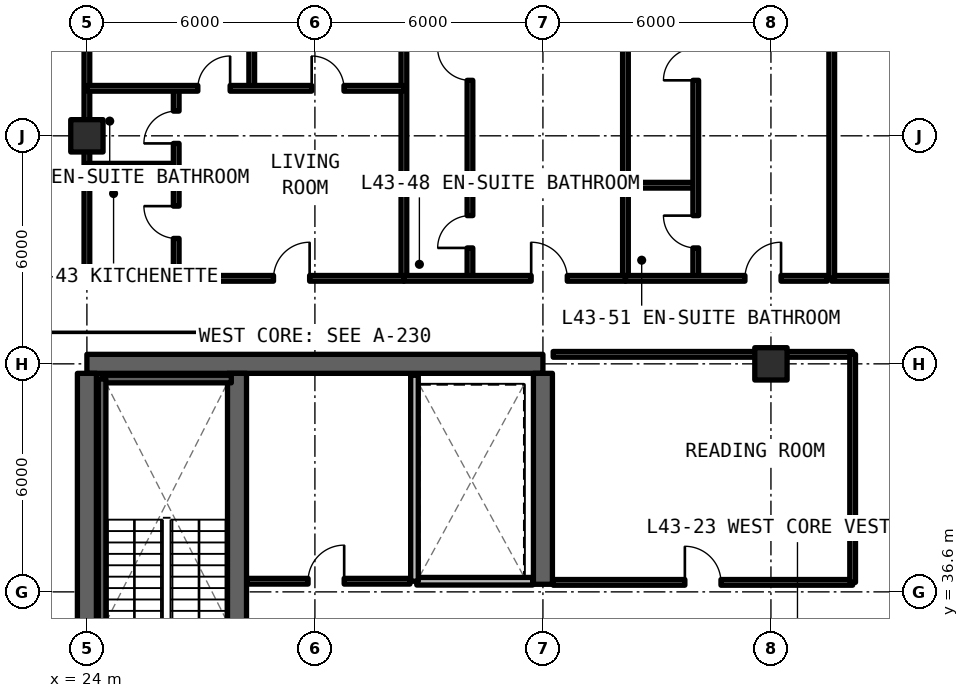
"""IFC4 building model, lengths in metres.
Left out: names, types, materials, properties, quantities, classifications, styles, units other than length and angle.
Written with IfcOpenShell. Run it as: python <this file> out.ifc"""

import sys

from ifc_helpers import new_model, si_unit, direction, frame, frame_2d, origin, origin_2d, place, context, subcontext, project, spatial, rectangle, extrude, element, fill, save


model = new_model("IFC4")
c1 = context("Model", 3, precision=1e-05, world=origin(), true_north=direction((0.0, 1.0)))
c2 = subcontext(c1, "Body", "Model", "MODEL_VIEW")
j1 = project(units=[si_unit("LENGTHUNIT", "METRE"), si_unit("PLANEANGLEUNIT", "RADIAN")], contexts=[c1])
p1 = place(None, origin())
s1 = spatial("IfcSite", under=j1, at=p1, CompositionType="ELEMENT")
p2 = place(p1, origin())
s2 = spatial("IfcBuilding", under=s1, at=p2, CompositionType="ELEMENT")
p3 = place(p2, frame((0.0, 0.0, 155.1)))
s3 = spatial("IfcBuildingStorey", under=s2, at=p3, CompositionType="ELEMENT", Elevation=155.1)
p4 = place(p3, frame((36.0, 42.6, 0.0), z_axis=(0.0, 0.0, 1.0), x_axis=(-1.0, 0.0, 0.0)))
e1 = element("IfcWall", 1, at=p4, inside=s3, PredefinedType="SHEAR", context=c2, shape_type="SweptSolid", body=[
    extrude(rectangle(XDim=12.0, YDim=0.5, at=frame_2d((6.0, 0.0))), origin(), (0.0, 0.0, 1.0), 3.3),
])
p5 = place(p3, frame((24.0, 24.85, 0.0), z_axis=(0.0, 0.0, 1.0), x_axis=(0.0, 1.0, 0.0)))
e2 = element("IfcWall", 2, at=p5, inside=s3, PredefinedType="SHEAR", context=c2, shape_type="SweptSolid", body=[
    extrude(rectangle(XDim=17.5, YDim=0.5, at=frame_2d((8.75, 0.0))), origin(), (0.0, 0.0, 1.0), 3.3),
])
p6 = place(p3, frame((36.0, 36.8, 0.0), z_axis=(0.0, 0.0, 1.0), x_axis=(0.0, 1.0, 0.0)))
e3 = element("IfcWall", 3, at=p6, inside=s3, PredefinedType="SHEAR", context=c2, shape_type="SweptSolid", body=[
    extrude(rectangle(XDim=5.55, YDim=0.5, at=frame_2d((2.775, 0.0))), origin(), (0.0, 0.0, 1.0), 3.3),
])
p7 = place(p3, frame((27.95, 24.85, 0.0), z_axis=(0.0, 0.0, 1.0), x_axis=(0.0, 1.0, 0.0)))
e4 = element("IfcWall", 4, at=p7, inside=s3, PredefinedType="SHEAR", context=c2, shape_type="SweptSolid", body=[
    extrude(rectangle(XDim=17.5, YDim=0.5, at=frame_2d((8.75, 0.0))), origin(), (0.0, 0.0, 1.0), 3.3),
])
p8 = place(p7, frame((0.4, 0.0, 0.0)))
e5 = element("IfcOpeningElement", 5, at=p8, cuts=e4, PredefinedType="OPENING", context=c2, shape_type="SweptSolid", body=[
    extrude(rectangle(XDim=1.15, YDim=2.15, at=frame_2d((0.575, 1.075))), frame((0.0, 0.26, 0.0), z_axis=(0.0, -1.0, 0.0), x_axis=(1.0, 0.0, 0.0)), (0.0, 0.0, 1.0), 0.52),
])
p9 = place(p7, frame((9.6, 0.0, 0.0)))
e6 = element("IfcOpeningElement", 6, at=p9, cuts=e4, PredefinedType="OPENING", context=c2, shape_type="SweptSolid", body=[
    extrude(rectangle(XDim=1.15, YDim=2.15, at=frame_2d((0.575, 1.075))), frame((0.0, 0.26, 0.0), z_axis=(0.0, -1.0, 0.0), x_axis=(1.0, 0.0, 0.0)), (0.0, 0.0, 1.0), 0.52),
])
for number, where, z_axis, x_axis in (
    (7, (42.0, 42.6, 0.0), (0.0, 0.0, 1.0), (1.0, 0.0, 0.0)),
    (8, (24.0, 48.6, 0.0), (0.0, 0.0, 1.0), (1.0, 0.0, 0.0)),
):
    element("IfcColumn", number, at=place(p3, frame(where, z_axis=z_axis, x_axis=x_axis)), inside=s3, PredefinedType="COLUMN", context=c2, shape_type="SweptSolid", body=[
        extrude(rectangle(XDim=0.85, YDim=0.85, at=origin_2d()), origin(), (0.0, 0.0, 1.0), 3.3),
    ])
p10 = place(p3, frame((28.22, 36.88, 0.0), z_axis=(0.0, 0.0, 1.0), x_axis=(1.0, 0.0, 0.0)))
e9 = element("IfcWall", 9, at=p10, inside=s3, PredefinedType="SOLIDWALL", context=c2, shape_type="SweptSolid", body=[
    extrude(rectangle(XDim=4.28, YDim=0.15, at=frame_2d((2.14, 0.0))), origin(), (0.0, 0.0, 1.0), 2.35),
])
p11 = place(p10, frame((1.6, 0.0, 0.0)))
e10 = element("IfcOpeningElement", 10, at=p11, cuts=e9, PredefinedType="OPENING", context=c2, shape_type="SweptSolid", body=[
    extrude(rectangle(XDim=0.95, YDim=2.15, at=frame_2d((0.475, 1.075))), frame((0.0, 0.085, 0.0), z_axis=(0.0, -1.0, 0.0), x_axis=(1.0, 0.0, 0.0)), (0.0, 0.0, 1.0), 0.17),
])
p12 = place(p3, frame((32.68, 36.88, 0.0), z_axis=(0.0, 0.0, 1.0), x_axis=(1.0, 0.0, 0.0)))
e11 = element("IfcWall", 11, at=p12, inside=s3, PredefinedType="SOLIDWALL", context=c2, shape_type="SweptSolid", body=[
    extrude(rectangle(XDim=3.05, YDim=0.2, at=frame_2d((1.525, 0.0))), origin(), (0.0, 0.0, 1.0), 2.35),
])
p13 = place(p3, frame((32.62, 36.88, 0.0), z_axis=(0.0, 0.0, 1.0), x_axis=(0.0, 1.0, 0.0)))
e12 = element("IfcWall", 12, at=p13, inside=s3, PredefinedType="SOLIDWALL", context=c2, shape_type="SweptSolid", body=[
    extrude(rectangle(XDim=5.42, YDim=0.2, at=frame_2d((2.71, 0.0))), origin(), (0.0, 0.0, 1.0), 2.35),
])
p14 = place(p3, frame((36.27, 36.85, 0.0), z_axis=(0.0, 0.0, 1.0), x_axis=(1.0, 0.0, 0.0)))
e13 = element("IfcWall", 13, at=p14, inside=s3, PredefinedType="SOLIDWALL", context=c2, shape_type="SweptSolid", body=[
    extrude(rectangle(XDim=7.88, YDim=0.15, at=frame_2d((3.94, 0.0))), origin(), (0.0, 0.0, 1.0), 2.35),
])
p15 = place(p14, frame((3.465, 0.0, 0.0)))
e14 = element("IfcOpeningElement", 14, at=p15, cuts=e13, PredefinedType="OPENING", context=c2, shape_type="SweptSolid", body=[
    extrude(rectangle(XDim=0.95, YDim=2.15, at=frame_2d((0.475, 1.075))), frame((0.0, 0.085, 0.0), z_axis=(0.0, -1.0, 0.0), x_axis=(1.0, 0.0, 0.0)), (0.0, 0.0, 1.0), 0.17),
])
p16 = place(p3, frame((36.27, 42.85, 0.0), z_axis=(0.0, 0.0, 1.0), x_axis=(1.0, 0.0, 0.0)))
e15 = element("IfcWall", 15, at=p16, inside=s3, PredefinedType="SOLIDWALL", context=c2, shape_type="SweptSolid", body=[
    extrude(rectangle(XDim=7.88, YDim=0.15, at=frame_2d((3.94, 0.0))), origin(), (0.0, 0.0, 1.0), 2.35),
])
p17 = place(p3, frame((44.15, 36.85, 0.0), z_axis=(0.0, 0.0, 1.0), x_axis=(0.0, 1.0, 0.0)))
e16 = element("IfcWall", 16, at=p17, inside=s3, PredefinedType="SOLIDWALL", context=c2, shape_type="SweptSolid", body=[
    extrude(rectangle(XDim=6.0, YDim=0.15, at=frame_2d((3.0, 0.0))), origin(), (0.0, 0.0, 1.0), 2.35),
])
p18 = place(p3, frame((43.6, 44.85, 0.0), z_axis=(0.0, 0.0, 1.0), x_axis=(1.0, 0.0, 0.0)))
e17 = element("IfcWall", 17, at=p18, inside=s3, PredefinedType="SOLIDWALL", context=c2, shape_type="SweptSolid", body=[
    extrude(rectangle(XDim=8.4, YDim=0.15, at=frame_2d((4.2, 0.0))), origin(), (0.0, 0.0, 1.0), 2.35),
])
p19 = place(p18, frame((3.65, 0.0, 0.0)))
e18 = element("IfcOpeningElement", 18, at=p19, cuts=e17, PredefinedType="OPENING", context=c2, shape_type="SweptSolid", body=[
    extrude(rectangle(XDim=1.1, YDim=2.15, at=frame_2d((0.55, 1.075))), frame((0.0, 0.085, 0.0), z_axis=(0.0, -1.0, 0.0), x_axis=(1.0, 0.0, 0.0)), (0.0, 0.0, 1.0), 0.17),
])
for number, where, z_axis, x_axis in (
    (19, (43.6, 44.85, 0.0), (0.0, 0.0, 1.0), (0.0, 1.0, 0.0)),
    (20, (24.0, 44.85, 0.0), (0.0, 0.0, 1.0), (0.0, 1.0, 0.0)),
    (21, (32.342, 44.85, 0.0), (0.0, 0.0, 1.0), (0.0, 1.0, 0.0)),
):
    element("IfcWall", number, at=place(p3, frame(where, z_axis=z_axis, x_axis=x_axis)), inside=s3, PredefinedType="SOLIDWALL", context=c2, shape_type="SweptSolid", body=[
        extrude(rectangle(XDim=10.2, YDim=0.15, at=frame_2d((5.1, 0.0))), origin(), (0.0, 0.0, 1.0), 2.35),
    ])
p20 = place(p3, frame((24.0, 47.8, 0.0), z_axis=(0.0, 0.0, 1.0), x_axis=(1.0, 0.0, 0.0)))
e22 = element("IfcWall", 22, at=p20, inside=s3, PredefinedType="PARTITIONING", context=c2, shape_type="SweptSolid", body=[
    extrude(rectangle(XDim=2.35, YDim=0.15, at=frame_2d((1.175, 0.0))), origin(), (0.0, 0.0, 1.0), 2.35),
])
p21 = place(p3, frame((26.35, 44.85, 0.0), z_axis=(0.0, 0.0, 1.0), x_axis=(0.0, 1.0, 0.0)))
e23 = element("IfcWall", 23, at=p21, inside=s3, PredefinedType="PARTITIONING", context=c2, shape_type="SweptSolid", body=[
    extrude(rectangle(XDim=5.0, YDim=0.15, at=frame_2d((2.5, 0.0))), origin(), (0.0, 0.0, 1.0), 2.35),
])
p22 = place(p21, frame((1.05, 0.0, 0.0)))
e24 = element("IfcOpeningElement", 24, at=p22, cuts=e23, PredefinedType="OPENING", context=c2, shape_type="SweptSolid", body=[
    extrude(rectangle(XDim=0.85, YDim=2.1, at=frame_2d((0.425, 1.05))), frame((0.0, 0.085, 0.0), z_axis=(0.0, -1.0, 0.0), x_axis=(1.0, 0.0, 0.0)), (0.0, 0.0, 1.0), 0.17),
])
p23 = place(p21, frame((3.55, 0.0, 0.0)))
e25 = element("IfcOpeningElement", 25, at=p23, cuts=e23, PredefinedType="OPENING", context=c2, shape_type="SweptSolid", body=[
    extrude(rectangle(XDim=0.85, YDim=2.1, at=frame_2d((0.425, 1.05))), frame((0.0, 0.085, 0.0), z_axis=(0.0, -1.0, 0.0), x_axis=(1.0, 0.0, 0.0)), (0.0, 0.0, 1.0), 0.17),
])
p24 = place(p3, frame((28.338, 49.85, 0.0), z_axis=(0.0, 0.0, 1.0), x_axis=(0.0, 1.0, 0.0)))
e26 = element("IfcWall", 26, at=p24, inside=s3, PredefinedType="PARTITIONING", context=c2, shape_type="SweptSolid", body=[
    extrude(rectangle(XDim=5.2, YDim=0.15, at=frame_2d((2.6, 0.0))), origin(), (0.0, 0.0, 1.0), 2.35),
])
p25 = place(p3, frame((24.0, 49.85, 0.0), z_axis=(0.0, 0.0, 1.0), x_axis=(1.0, 0.0, 0.0)))
e27 = element("IfcWall", 27, at=p25, inside=s3, PredefinedType="PARTITIONING", context=c2, shape_type="SweptSolid", body=[
    extrude(rectangle(XDim=8.342, YDim=0.15, at=frame_2d((4.171, 0.0))), origin(), (0.0, 0.0, 1.0), 2.35),
])
p26 = place(p25, frame((2.919, 0.0, 0.0)))
e28 = element("IfcOpeningElement", 28, at=p26, cuts=e27, PredefinedType="OPENING", context=c2, shape_type="SweptSolid", body=[
    extrude(rectangle(XDim=0.85, YDim=2.1, at=frame_2d((0.425, 1.05))), frame((0.0, 0.085, 0.0), z_axis=(0.0, -1.0, 0.0), x_axis=(1.0, 0.0, 0.0)), (0.0, 0.0, 1.0), 0.17),
])
p27 = place(p25, frame((5.915, 0.0, 0.0)))
e29 = element("IfcOpeningElement", 29, at=p27, cuts=e27, PredefinedType="OPENING", context=c2, shape_type="SweptSolid", body=[
    extrude(rectangle(XDim=0.85, YDim=2.1, at=frame_2d((0.425, 1.05))), frame((0.0, 0.085, 0.0), z_axis=(0.0, -1.0, 0.0), x_axis=(1.0, 0.0, 0.0)), (0.0, 0.0, 1.0), 0.17),
])
p28 = place(p3, frame((24.0, 44.85, 0.0), z_axis=(0.0, 0.0, 1.0), x_axis=(1.0, 0.0, 0.0)))
e30 = element("IfcWall", 30, at=p28, inside=s3, PredefinedType="SOLIDWALL", context=c2, shape_type="SweptSolid", body=[
    extrude(rectangle(XDim=8.342, YDim=0.15, at=frame_2d((4.171, 0.0))), origin(), (0.0, 0.0, 1.0), 2.35),
])
p29 = place(p28, frame((4.911, 0.0, 0.0)))
e31 = element("IfcOpeningElement", 31, at=p29, cuts=e30, PredefinedType="OPENING", context=c2, shape_type="SweptSolid", body=[
    extrude(rectangle(XDim=0.95, YDim=2.15, at=frame_2d((0.475, 1.075))), frame((0.0, 0.085, 0.0), z_axis=(0.0, -1.0, 0.0), x_axis=(1.0, 0.0, 0.0)), (0.0, 0.0, 1.0), 0.17),
])
p30 = place(p3, frame((38.172, 44.85, 0.0), z_axis=(0.0, 0.0, 1.0), x_axis=(0.0, 1.0, 0.0)))
e32 = element("IfcWall", 32, at=p30, inside=s3, PredefinedType="SOLIDWALL", context=c2, shape_type="SweptSolid", body=[
    extrude(rectangle(XDim=10.2, YDim=0.15, at=frame_2d((5.1, 0.0))), origin(), (0.0, 0.0, 1.0), 2.35),
])
p31 = place(p3, frame((32.342, 47.3, 0.0), z_axis=(0.0, 0.0, 1.0), x_axis=(1.0, 0.0, 0.0)))
e33 = element("IfcWall", 33, at=p31, inside=s3, PredefinedType="PARTITIONING", context=c2, shape_type="SweptSolid", body=[
    extrude(rectangle(XDim=1.738, YDim=0.15, at=frame_2d((0.869, 0.0))), origin(), (0.0, 0.0, 1.0), 2.35),
])
p32 = place(p3, frame((34.08, 44.85, 0.0), z_axis=(0.0, 0.0, 1.0), x_axis=(0.0, 1.0, 0.0)))
e34 = element("IfcWall", 34, at=p32, inside=s3, PredefinedType="PARTITIONING", context=c2, shape_type="SweptSolid", body=[
    extrude(rectangle(XDim=10.2, YDim=0.15, at=frame_2d((5.1, 0.0))), origin(), (0.0, 0.0, 1.0), 2.35),
])
p33 = place(p32, frame((0.8, 0.0, 0.0)))
e35 = element("IfcOpeningElement", 35, at=p33, cuts=e34, PredefinedType="OPENING", context=c2, shape_type="SweptSolid", body=[
    extrude(rectangle(XDim=0.85, YDim=2.1, at=frame_2d((0.425, 1.05))), frame((0.0, 0.085, 0.0), z_axis=(0.0, -1.0, 0.0), x_axis=(1.0, 0.0, 0.0)), (0.0, 0.0, 1.0), 0.17),
])
p34 = place(p32, frame((5.21, 0.0, 0.0)))
e36 = element("IfcOpeningElement", 36, at=p34, cuts=e34, PredefinedType="OPENING", context=c2, shape_type="SweptSolid", body=[
    extrude(rectangle(XDim=0.85, YDim=2.1, at=frame_2d((0.425, 1.05))), frame((0.0, 0.085, 0.0), z_axis=(0.0, -1.0, 0.0), x_axis=(1.0, 0.0, 0.0)), (0.0, 0.0, 1.0), 0.17),
])
p35 = place(p3, frame((32.342, 44.85, 0.0), z_axis=(0.0, 0.0, 1.0), x_axis=(1.0, 0.0, 0.0)))
e37 = element("IfcWall", 37, at=p35, inside=s3, PredefinedType="SOLIDWALL", context=c2, shape_type="SweptSolid", body=[
    extrude(rectangle(XDim=5.83, YDim=0.15, at=frame_2d((2.915, 0.0))), origin(), (0.0, 0.0, 1.0), 2.35),
])
p36 = place(p35, frame((3.349, 0.0, 0.0)))
e38 = element("IfcOpeningElement", 38, at=p36, cuts=e37, PredefinedType="OPENING", context=c2, shape_type="SweptSolid", body=[
    extrude(rectangle(XDim=0.95, YDim=2.15, at=frame_2d((0.475, 1.075))), frame((0.0, 0.085, 0.0), z_axis=(0.0, -1.0, 0.0), x_axis=(1.0, 0.0, 0.0)), (0.0, 0.0, 1.0), 0.17),
])
p37 = place(p3, frame((38.172, 47.3, 0.0), z_axis=(0.0, 0.0, 1.0), x_axis=(1.0, 0.0, 0.0)))
e39 = element("IfcWall", 39, at=p37, inside=s3, PredefinedType="PARTITIONING", context=c2, shape_type="SweptSolid", body=[
    extrude(rectangle(XDim=1.85, YDim=0.15, at=frame_2d((0.925, 0.0))), origin(), (0.0, 0.0, 1.0), 2.35),
])
p38 = place(p3, frame((40.021, 44.85, 0.0), z_axis=(0.0, 0.0, 1.0), x_axis=(0.0, 1.0, 0.0)))
e40 = element("IfcWall", 40, at=p38, inside=s3, PredefinedType="PARTITIONING", context=c2, shape_type="SweptSolid", body=[
    extrude(rectangle(XDim=10.2, YDim=0.15, at=frame_2d((5.1, 0.0))), origin(), (0.0, 0.0, 1.0), 2.35),
])
p39 = place(p38, frame((0.8, 0.0, 0.0)))
e41 = element("IfcOpeningElement", 41, at=p39, cuts=e40, PredefinedType="OPENING", context=c2, shape_type="SweptSolid", body=[
    extrude(rectangle(XDim=0.85, YDim=2.1, at=frame_2d((0.425, 1.05))), frame((0.0, 0.085, 0.0), z_axis=(0.0, -1.0, 0.0), x_axis=(1.0, 0.0, 0.0)), (0.0, 0.0, 1.0), 0.17),
])
p40 = place(p38, frame((5.21, 0.0, 0.0)))
e42 = element("IfcOpeningElement", 42, at=p40, cuts=e40, PredefinedType="OPENING", context=c2, shape_type="SweptSolid", body=[
    extrude(rectangle(XDim=0.85, YDim=2.1, at=frame_2d((0.425, 1.05))), frame((0.0, 0.085, 0.0), z_axis=(0.0, -1.0, 0.0), x_axis=(1.0, 0.0, 0.0)), (0.0, 0.0, 1.0), 0.17),
])
p41 = place(p3, frame((38.172, 44.85, 0.0), z_axis=(0.0, 0.0, 1.0), x_axis=(1.0, 0.0, 0.0)))
e43 = element("IfcWall", 43, at=p41, inside=s3, PredefinedType="SOLIDWALL", context=c2, shape_type="SweptSolid", body=[
    extrude(rectangle(XDim=5.308, YDim=0.15, at=frame_2d((2.654, 0.0))), origin(), (0.0, 0.0, 1.0), 2.35),
])
p42 = place(p41, frame((3.144, 0.0, 0.0)))
e44 = element("IfcOpeningElement", 44, at=p42, cuts=e43, PredefinedType="OPENING", context=c2, shape_type="SweptSolid", body=[
    extrude(rectangle(XDim=0.95, YDim=2.15, at=frame_2d((0.475, 1.075))), frame((0.0, 0.085, 0.0), z_axis=(0.0, -1.0, 0.0), x_axis=(1.0, 0.0, 0.0)), (0.0, 0.0, 1.0), 0.17),
])
p43 = place(p3, frame((27.8, 42.2, 0.0), z_axis=(0.0, 0.0, 1.0), x_axis=(-1.0, 0.0, 0.0)))
e45 = element("IfcWall", 45, at=p43, inside=s3, PredefinedType="SOLIDWALL", context=c2, shape_type="SweptSolid", body=[
    extrude(rectangle(XDim=3.4, YDim=0.2, at=frame_2d((1.7, 0.0))), origin(), (0.0, 0.0, 1.0), 3.3),
])
p44 = place(p3, frame((24.4, 42.2, 0.0), z_axis=(0.0, 0.0, 1.0), x_axis=(0.0, -1.0, 0.0)))
e46 = element("IfcWall", 46, at=p44, inside=s3, PredefinedType="SOLIDWALL", context=c2, shape_type="SweptSolid", body=[
    extrude(rectangle(XDim=8.0, YDim=0.2, at=frame_2d((4.0, 0.0))), origin(), (0.0, 0.0, 1.0), 3.3),
])
p45 = place(p11, origin())
e47 = element("IfcDoor", 47, at=p45, inside=s3, OperationType="SINGLE_SWING_RIGHT", PredefinedType="DOOR", context=c2, shape_type="SweptSolid", body=[
    extrude(rectangle(XDim=0.95, YDim=2.15, at=frame_2d((0.475, 1.075))), frame((0.0, 0.025, 0.0), z_axis=(0.0, -1.0, 0.0), x_axis=(1.0, 0.0, 0.0)), (0.0, 0.0, 1.0), 0.05),
])
fill(e10, e47)
p46 = place(p15, origin())
e48 = element("IfcDoor", 48, at=p46, inside=s3, OperationType="SINGLE_SWING_LEFT", PredefinedType="DOOR", context=c2, shape_type="SweptSolid", body=[
    extrude(rectangle(XDim=0.95, YDim=2.15, at=frame_2d((0.475, 1.075))), frame((0.0, 0.025, 0.0), z_axis=(0.0, -1.0, 0.0), x_axis=(1.0, 0.0, 0.0)), (0.0, 0.0, 1.0), 0.05),
])
fill(e14, e48)
p47 = place(p22, origin())
e49 = element("IfcDoor", 49, at=p47, inside=s3, OperationType="SINGLE_SWING_RIGHT", PredefinedType="DOOR", context=c2, shape_type="SweptSolid", body=[
    extrude(rectangle(XDim=0.85, YDim=2.1, at=frame_2d((0.425, 1.05))), frame((0.0, 0.025, 0.0), z_axis=(0.0, -1.0, 0.0), x_axis=(1.0, 0.0, 0.0)), (0.0, 0.0, 1.0), 0.05),
])
fill(e24, e49)
p48 = place(p23, origin())
e50 = element("IfcDoor", 50, at=p48, inside=s3, OperationType="SINGLE_SWING_LEFT", PredefinedType="DOOR", context=c2, shape_type="SweptSolid", body=[
    extrude(rectangle(XDim=0.85, YDim=2.1, at=frame_2d((0.425, 1.05))), frame((0.0, 0.025, 0.0), z_axis=(0.0, -1.0, 0.0), x_axis=(1.0, 0.0, 0.0)), (0.0, 0.0, 1.0), 0.05),
])
fill(e25, e50)
p49 = place(p26, origin())
e51 = element("IfcDoor", 51, at=p49, inside=s3, OperationType="SINGLE_SWING_RIGHT", PredefinedType="DOOR", context=c2, shape_type="SweptSolid", body=[
    extrude(rectangle(XDim=0.85, YDim=2.1, at=frame_2d((0.425, 1.05))), frame((0.0, 0.025, 0.0), z_axis=(0.0, -1.0, 0.0), x_axis=(1.0, 0.0, 0.0)), (0.0, 0.0, 1.0), 0.05),
])
fill(e28, e51)
p50 = place(p27, origin())
e52 = element("IfcDoor", 52, at=p50, inside=s3, OperationType="SINGLE_SWING_LEFT", PredefinedType="DOOR", context=c2, shape_type="SweptSolid", body=[
    extrude(rectangle(XDim=0.85, YDim=2.1, at=frame_2d((0.425, 1.05))), frame((0.0, 0.025, 0.0), z_axis=(0.0, -1.0, 0.0), x_axis=(1.0, 0.0, 0.0)), (0.0, 0.0, 1.0), 0.05),
])
fill(e29, e52)
p51 = place(p29, origin())
e53 = element("IfcDoor", 53, at=p51, inside=s3, OperationType="SINGLE_SWING_RIGHT", PredefinedType="DOOR", context=c2, shape_type="SweptSolid", body=[
    extrude(rectangle(XDim=0.95, YDim=2.15, at=frame_2d((0.475, 1.075))), frame((0.0, 0.025, 0.0), z_axis=(0.0, -1.0, 0.0), x_axis=(1.0, 0.0, 0.0)), (0.0, 0.0, 1.0), 0.05),
])
fill(e31, e53)
p52 = place(p33, origin())
e54 = element("IfcDoor", 54, at=p52, inside=s3, OperationType="SINGLE_SWING_LEFT", PredefinedType="DOOR", context=c2, shape_type="SweptSolid", body=[
    extrude(rectangle(XDim=0.85, YDim=2.1, at=frame_2d((0.425, 1.05))), frame((0.0, 0.025, 0.0), z_axis=(0.0, -1.0, 0.0), x_axis=(1.0, 0.0, 0.0)), (0.0, 0.0, 1.0), 0.05),
])
fill(e35, e54)
p53 = place(p34, origin())
e55 = element("IfcDoor", 55, at=p53, inside=s3, OperationType="SINGLE_SWING_RIGHT", PredefinedType="DOOR", context=c2, shape_type="SweptSolid", body=[
    extrude(rectangle(XDim=0.85, YDim=2.1, at=frame_2d((0.425, 1.05))), frame((0.0, 0.025, 0.0), z_axis=(0.0, -1.0, 0.0), x_axis=(1.0, 0.0, 0.0)), (0.0, 0.0, 1.0), 0.05),
])
fill(e36, e55)
p54 = place(p36, origin())
e56 = element("IfcDoor", 56, at=p54, inside=s3, OperationType="SINGLE_SWING_LEFT", PredefinedType="DOOR", context=c2, shape_type="SweptSolid", body=[
    extrude(rectangle(XDim=0.95, YDim=2.15, at=frame_2d((0.475, 1.075))), frame((0.0, 0.025, 0.0), z_axis=(0.0, -1.0, 0.0), x_axis=(1.0, 0.0, 0.0)), (0.0, 0.0, 1.0), 0.05),
])
fill(e38, e56)
p55 = place(p39, origin())
e57 = element("IfcDoor", 57, at=p55, inside=s3, OperationType="SINGLE_SWING_RIGHT", PredefinedType="DOOR", context=c2, shape_type="SweptSolid", body=[
    extrude(rectangle(XDim=0.85, YDim=2.1, at=frame_2d((0.425, 1.05))), frame((0.0, 0.025, 0.0), z_axis=(0.0, -1.0, 0.0), x_axis=(1.0, 0.0, 0.0)), (0.0, 0.0, 1.0), 0.05),
])
fill(e41, e57)
p56 = place(p40, origin())
e58 = element("IfcDoor", 58, at=p56, inside=s3, OperationType="SINGLE_SWING_LEFT", PredefinedType="DOOR", context=c2, shape_type="SweptSolid", body=[
    extrude(rectangle(XDim=0.85, YDim=2.1, at=frame_2d((0.425, 1.05))), frame((0.0, 0.025, 0.0), z_axis=(0.0, -1.0, 0.0), x_axis=(1.0, 0.0, 0.0)), (0.0, 0.0, 1.0), 0.05),
])
fill(e42, e58)
p57 = place(p42, origin())
e59 = element("IfcDoor", 59, at=p57, inside=s3, OperationType="SINGLE_SWING_RIGHT", PredefinedType="DOOR", context=c2, shape_type="SweptSolid", body=[
    extrude(rectangle(XDim=0.95, YDim=2.15, at=frame_2d((0.475, 1.075))), frame((0.0, 0.025, 0.0), z_axis=(0.0, -1.0, 0.0), x_axis=(1.0, 0.0, 0.0)), (0.0, 0.0, 1.0), 0.05),
])
fill(e44, e59)
save(model, sys.argv[1])
